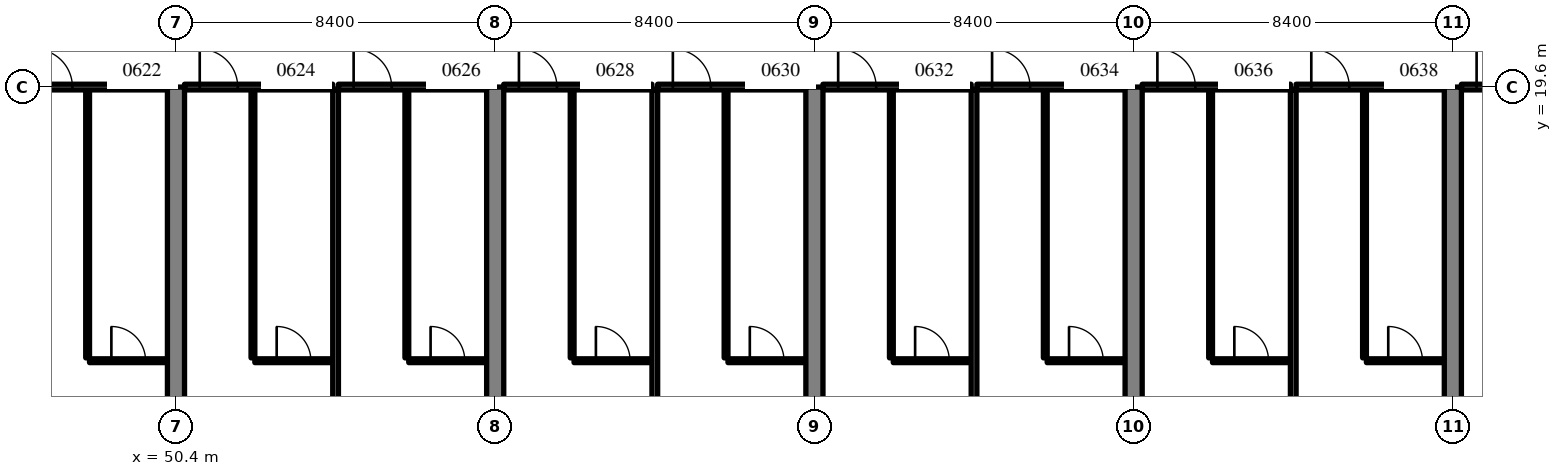
"""IFC4 building model, lengths in metres.
Left out: names, types, materials, properties, quantities, classifications, styles, units other than length and angle.
Written with IfcOpenShell. Run it as: python <this file> out.ifc"""

import sys

from ifc_helpers import new_model, si_unit, direction, frame, frame_2d, origin, place, context, subcontext, project, spatial, rectangle, extrude, source, transform, mapped, element, fill, save


model = new_model("IFC4")
c1 = context("Model", 3, precision=1e-05, world=origin(), true_north=direction((0.0, 1.0)))
c2 = subcontext(c1, "Body", "Model", "MODEL_VIEW")
j1 = project(units=[si_unit("LENGTHUNIT", "METRE"), si_unit("PLANEANGLEUNIT", "RADIAN")], contexts=[c1])
p1 = place(None, origin())
s1 = spatial("IfcSite", under=j1, at=p1, CompositionType="ELEMENT")
p2 = place(p1, origin())
s2 = spatial("IfcBuilding", under=s1, at=p2, CompositionType="ELEMENT")
p3 = place(p2, frame((0.0, 0.0, 31.6)))
s3 = spatial("IfcBuildingStorey", under=s2, at=p3, CompositionType="ELEMENT", Elevation=31.6)
m1 = source(origin(), c2, "Body", "SweptSolid", [
    extrude(rectangle(XDim=18.6, YDim=0.45, at=frame_2d((9.3, 0.0))), origin(), (0.0, 0.0, 1.0), 3.52),
])
p4 = place(p3, frame((50.4, 1.0, 0.0), z_axis=(0.0, 0.0, 1.0), x_axis=(0.0, 1.0, 0.0)))
e1 = element("IfcWall", 1, at=p4, inside=s3, PredefinedType="SHEAR", context=c2, shape_type="MappedRepresentation", body=[
    mapped(m1, transform((0.0, 0.0, 0.0), scale=1.0)),
])
m2 = source(origin(), c2, "Body", "SweptSolid", [
    extrude(rectangle(XDim=19.6, YDim=0.45, at=frame_2d((9.8, 0.0))), origin(), (0.0, 0.0, 1.0), 3.52),
])
for number, where, z_axis, x_axis in (
    (2, (58.8, 0.0, 0.0), (0.0, 0.0, 1.0), (0.0, 1.0, 0.0)),
    (3, (67.2, 0.0, 0.0), (0.0, 0.0, 1.0), (0.0, 1.0, 0.0)),
    (4, (75.6, 0.0, 0.0), (0.0, 0.0, 1.0), (0.0, 1.0, 0.0)),
    (5, (84.0, 0.0, 0.0), (0.0, 0.0, 1.0), (0.0, 1.0, 0.0)),
):
    element("IfcWall", number, at=place(p3, frame(where, z_axis=z_axis, x_axis=x_axis)), inside=s3, PredefinedType="SHEAR", context=c2, shape_type="MappedRepresentation", body=[
        mapped(m2, transform((0.0, 0.0, 0.0), scale=1.0)),
    ])
m3 = source(origin(), c2, "Body", "SweptSolid", [
    extrude(rectangle(XDim=7.05, YDim=0.1, at=frame_2d((3.525, 0.0))), origin(), (0.0, 0.0, 1.0), 3.52),
])
p5 = place(p3, frame((48.075, 12.475, 0.0), z_axis=(0.0, 0.0, 1.0), x_axis=(0.0, 1.0, 0.0)))
e6 = element("IfcWall", 6, at=p5, inside=s3, PredefinedType="PARTITIONING", context=c2, shape_type="MappedRepresentation", body=[
    mapped(m3, transform((0.0, 0.0, 0.0), scale=1.0)),
])
m4 = source(origin(), c2, "Body", "SweptSolid", [
    extrude(rectangle(XDim=2.05, YDim=0.1, at=frame_2d((1.025, 0.0))), origin(), (0.0, 0.0, 1.0), 3.52),
])
p6 = place(p3, frame((48.125, 12.4, 0.0), z_axis=(0.0, 0.0, 1.0), x_axis=(1.0, 0.0, 0.0)))
e7 = element("IfcWall", 7, at=p6, inside=s3, PredefinedType="PARTITIONING", context=c2, shape_type="MappedRepresentation", body=[
    mapped(m4, transform((0.0, 0.0, 0.0), scale=1.0)),
])
m5 = source(origin(), c2, "Body", "SweptSolid", [
    extrude(rectangle(XDim=0.9, YDim=2.1, at=frame_2d((0.45, 1.05))), frame((0.0, 0.06, 0.0), z_axis=(0.0, -1.0, 0.0), x_axis=(1.0, 0.0, 0.0)), (0.0, 0.0, 1.0), 0.12),
])
p7 = place(p6, frame((0.575, 0.0, 0.0)))
e8 = element("IfcOpeningElement", 8, at=p7, cuts=e7, PredefinedType="OPENING", context=c2, shape_type="MappedRepresentation", body=[
    mapped(m5, transform((0.0, 0.0, 0.0), scale=1.0)),
])
m6 = source(origin(), c2, "Body", "SweptSolid", [
    extrude(rectangle(XDim=3.9, YDim=0.15, at=frame_2d((1.95, 0.0))), origin(), (0.0, 0.0, 1.0), 2.82),
])
p8 = place(p3, frame((46.275, 19.6, 0.0), z_axis=(0.0, 0.0, 1.0), x_axis=(1.0, 0.0, 0.0)))
e9 = element("IfcWall", 9, at=p8, inside=s3, PredefinedType="PARTITIONING", context=c2, shape_type="MappedRepresentation", body=[
    mapped(m6, transform((0.0, 0.0, 0.0), scale=1.0)),
])
m7 = source(origin(), c2, "Body", "SweptSolid", [
    extrude(rectangle(XDim=1.0, YDim=2.1, at=frame_2d((0.5, 1.05))), frame((0.0, 0.085, 0.0), z_axis=(0.0, -1.0, 0.0), x_axis=(1.0, 0.0, 0.0)), (0.0, 0.0, 1.0), 0.17),
])
p9 = place(p8, frame((0.4, 0.0, 0.0)))
e10 = element("IfcOpeningElement", 10, at=p9, cuts=e9, PredefinedType="OPENING", context=c2, shape_type="MappedRepresentation", body=[
    mapped(m7, transform((0.0, 0.0, 0.0), scale=1.0)),
])
p10 = place(p3, frame((52.425, 12.475, 0.0), z_axis=(0.0, 0.0, 1.0), x_axis=(0.0, 1.0, 0.0)))
e11 = element("IfcWall", 11, at=p10, inside=s3, PredefinedType="PARTITIONING", context=c2, shape_type="MappedRepresentation", body=[
    mapped(m3, transform((0.0, 0.0, 0.0), scale=1.0)),
])
m8 = source(origin(), c2, "Body", "SweptSolid", [
    extrude(rectangle(XDim=2.05, YDim=0.1, at=frame_2d((1.025, 0.0))), origin(), (0.0, 0.0, 1.0), 3.52),
])
p11 = place(p3, frame((52.475, 12.4, 0.0), z_axis=(0.0, 0.0, 1.0), x_axis=(1.0, 0.0, 0.0)))
e12 = element("IfcWall", 12, at=p11, inside=s3, PredefinedType="PARTITIONING", context=c2, shape_type="MappedRepresentation", body=[
    mapped(m8, transform((0.0, 0.0, 0.0), scale=1.0)),
])
p12 = place(p11, frame((0.575, 0.0, 0.0)))
e13 = element("IfcOpeningElement", 13, at=p12, cuts=e12, PredefinedType="OPENING", context=c2, shape_type="MappedRepresentation", body=[
    mapped(m5, transform((0.0, 0.0, 0.0), scale=1.0)),
])
m9 = source(origin(), c2, "Body", "SweptSolid", [
    extrude(rectangle(XDim=3.9, YDim=0.15, at=frame_2d((1.95, 0.0))), origin(), (0.0, 0.0, 1.0), 2.82),
])
p13 = place(p3, frame((50.625, 19.6, 0.0), z_axis=(0.0, 0.0, 1.0), x_axis=(1.0, 0.0, 0.0)))
e14 = element("IfcWall", 14, at=p13, inside=s3, PredefinedType="PARTITIONING", context=c2, shape_type="MappedRepresentation", body=[
    mapped(m9, transform((0.0, 0.0, 0.0), scale=1.0)),
])
p14 = place(p13, frame((0.4, 0.0, 0.0)))
e15 = element("IfcOpeningElement", 15, at=p14, cuts=e14, PredefinedType="OPENING", context=c2, shape_type="MappedRepresentation", body=[
    mapped(m7, transform((0.0, 0.0, 0.0), scale=1.0)),
])
p15 = place(p3, frame((56.475, 12.475, 0.0), z_axis=(0.0, 0.0, 1.0), x_axis=(0.0, 1.0, 0.0)))
e16 = element("IfcWall", 16, at=p15, inside=s3, PredefinedType="PARTITIONING", context=c2, shape_type="MappedRepresentation", body=[
    mapped(m3, transform((0.0, 0.0, 0.0), scale=1.0)),
])
p16 = place(p3, frame((56.525, 12.4, 0.0), z_axis=(0.0, 0.0, 1.0), x_axis=(1.0, 0.0, 0.0)))
e17 = element("IfcWall", 17, at=p16, inside=s3, PredefinedType="PARTITIONING", context=c2, shape_type="MappedRepresentation", body=[
    mapped(m4, transform((0.0, 0.0, 0.0), scale=1.0)),
])
p17 = place(p16, frame((0.575, 0.0, 0.0)))
e18 = element("IfcOpeningElement", 18, at=p17, cuts=e17, PredefinedType="OPENING", context=c2, shape_type="MappedRepresentation", body=[
    mapped(m5, transform((0.0, 0.0, 0.0), scale=1.0)),
])
p18 = place(p3, frame((54.675, 19.6, 0.0), z_axis=(0.0, 0.0, 1.0), x_axis=(1.0, 0.0, 0.0)))
e19 = element("IfcWall", 19, at=p18, inside=s3, PredefinedType="PARTITIONING", context=c2, shape_type="MappedRepresentation", body=[
    mapped(m9, transform((0.0, 0.0, 0.0), scale=1.0)),
])
p19 = place(p18, frame((0.4, 0.0, 0.0)))
e20 = element("IfcOpeningElement", 20, at=p19, cuts=e19, PredefinedType="OPENING", context=c2, shape_type="MappedRepresentation", body=[
    mapped(m7, transform((0.0, 0.0, 0.0), scale=1.0)),
])
m10 = source(origin(), c2, "Body", "SweptSolid", [
    extrude(rectangle(XDim=20.406, YDim=0.15, at=frame_2d((10.203, 0.0))), origin(), (0.0, 0.0, 1.0), 3.52),
])
p20 = place(p3, frame((54.6, -0.881, 0.0), z_axis=(0.0, 0.0, 1.0), x_axis=(0.0, 1.0, 0.0)))
e21 = element("IfcWall", 21, at=p20, inside=s3, PredefinedType="PARTITIONING", context=c2, shape_type="MappedRepresentation", body=[
    mapped(m10, transform((0.0, 0.0, 0.0), scale=1.0)),
])
p21 = place(p3, frame((60.825, 12.475, 0.0), z_axis=(0.0, 0.0, 1.0), x_axis=(0.0, 1.0, 0.0)))
e22 = element("IfcWall", 22, at=p21, inside=s3, PredefinedType="PARTITIONING", context=c2, shape_type="MappedRepresentation", body=[
    mapped(m3, transform((0.0, 0.0, 0.0), scale=1.0)),
])
p22 = place(p3, frame((60.875, 12.4, 0.0), z_axis=(0.0, 0.0, 1.0), x_axis=(1.0, 0.0, 0.0)))
e23 = element("IfcWall", 23, at=p22, inside=s3, PredefinedType="PARTITIONING", context=c2, shape_type="MappedRepresentation", body=[
    mapped(m4, transform((0.0, 0.0, 0.0), scale=1.0)),
])
p23 = place(p22, frame((0.575, 0.0, 0.0)))
e24 = element("IfcOpeningElement", 24, at=p23, cuts=e23, PredefinedType="OPENING", context=c2, shape_type="MappedRepresentation", body=[
    mapped(m5, transform((0.0, 0.0, 0.0), scale=1.0)),
])
p24 = place(p3, frame((59.025, 19.6, 0.0), z_axis=(0.0, 0.0, 1.0), x_axis=(1.0, 0.0, 0.0)))
e25 = element("IfcWall", 25, at=p24, inside=s3, PredefinedType="PARTITIONING", context=c2, shape_type="MappedRepresentation", body=[
    mapped(m6, transform((0.0, 0.0, 0.0), scale=1.0)),
])
p25 = place(p24, frame((0.4, 0.0, 0.0)))
e26 = element("IfcOpeningElement", 26, at=p25, cuts=e25, PredefinedType="OPENING", context=c2, shape_type="MappedRepresentation", body=[
    mapped(m7, transform((0.0, 0.0, 0.0), scale=1.0)),
])
p26 = place(p3, frame((64.875, 12.475, 0.0), z_axis=(0.0, 0.0, 1.0), x_axis=(0.0, 1.0, 0.0)))
e27 = element("IfcWall", 27, at=p26, inside=s3, PredefinedType="PARTITIONING", context=c2, shape_type="MappedRepresentation", body=[
    mapped(m3, transform((0.0, 0.0, 0.0), scale=1.0)),
])
p27 = place(p3, frame((64.925, 12.4, 0.0), z_axis=(0.0, 0.0, 1.0), x_axis=(1.0, 0.0, 0.0)))
e28 = element("IfcWall", 28, at=p27, inside=s3, PredefinedType="PARTITIONING", context=c2, shape_type="MappedRepresentation", body=[
    mapped(m4, transform((0.0, 0.0, 0.0), scale=1.0)),
])
p28 = place(p27, frame((0.575, 0.0, 0.0)))
e29 = element("IfcOpeningElement", 29, at=p28, cuts=e28, PredefinedType="OPENING", context=c2, shape_type="MappedRepresentation", body=[
    mapped(m5, transform((0.0, 0.0, 0.0), scale=1.0)),
])
p29 = place(p3, frame((63.075, 19.6, 0.0), z_axis=(0.0, 0.0, 1.0), x_axis=(1.0, 0.0, 0.0)))
e30 = element("IfcWall", 30, at=p29, inside=s3, PredefinedType="PARTITIONING", context=c2, shape_type="MappedRepresentation", body=[
    mapped(m6, transform((0.0, 0.0, 0.0), scale=1.0)),
])
p30 = place(p29, frame((0.4, 0.0, 0.0)))
e31 = element("IfcOpeningElement", 31, at=p30, cuts=e30, PredefinedType="OPENING", context=c2, shape_type="MappedRepresentation", body=[
    mapped(m7, transform((0.0, 0.0, 0.0), scale=1.0)),
])
m11 = source(origin(), c2, "Body", "SweptSolid", [
    extrude(rectangle(XDim=20.998, YDim=0.15, at=frame_2d((10.499, 0.0))), origin(), (0.0, 0.0, 1.0), 3.52),
])
p31 = place(p3, frame((63.0, -1.473, 0.0), z_axis=(0.0, 0.0, 1.0), x_axis=(0.0, 1.0, 0.0)))
e32 = element("IfcWall", 32, at=p31, inside=s3, PredefinedType="PARTITIONING", context=c2, shape_type="MappedRepresentation", body=[
    mapped(m11, transform((0.0, 0.0, 0.0), scale=1.0)),
])
p32 = place(p3, frame((69.225, 12.475, 0.0), z_axis=(0.0, 0.0, 1.0), x_axis=(0.0, 1.0, 0.0)))
e33 = element("IfcWall", 33, at=p32, inside=s3, PredefinedType="PARTITIONING", context=c2, shape_type="MappedRepresentation", body=[
    mapped(m3, transform((0.0, 0.0, 0.0), scale=1.0)),
])
p33 = place(p3, frame((69.275, 12.4, 0.0), z_axis=(0.0, 0.0, 1.0), x_axis=(1.0, 0.0, 0.0)))
e34 = element("IfcWall", 34, at=p33, inside=s3, PredefinedType="PARTITIONING", context=c2, shape_type="MappedRepresentation", body=[
    mapped(m4, transform((0.0, 0.0, 0.0), scale=1.0)),
])
p34 = place(p33, frame((0.575, 0.0, 0.0)))
e35 = element("IfcOpeningElement", 35, at=p34, cuts=e34, PredefinedType="OPENING", context=c2, shape_type="MappedRepresentation", body=[
    mapped(m5, transform((0.0, 0.0, 0.0), scale=1.0)),
])
p35 = place(p3, frame((67.425, 19.6, 0.0), z_axis=(0.0, 0.0, 1.0), x_axis=(1.0, 0.0, 0.0)))
e36 = element("IfcWall", 36, at=p35, inside=s3, PredefinedType="PARTITIONING", context=c2, shape_type="MappedRepresentation", body=[
    mapped(m9, transform((0.0, 0.0, 0.0), scale=1.0)),
])
p36 = place(p35, frame((0.4, 0.0, 0.0)))
e37 = element("IfcOpeningElement", 37, at=p36, cuts=e36, PredefinedType="OPENING", context=c2, shape_type="MappedRepresentation", body=[
    mapped(m7, transform((0.0, 0.0, 0.0), scale=1.0)),
])
p37 = place(p3, frame((73.275, 12.475, 0.0), z_axis=(0.0, 0.0, 1.0), x_axis=(0.0, 1.0, 0.0)))
e38 = element("IfcWall", 38, at=p37, inside=s3, PredefinedType="PARTITIONING", context=c2, shape_type="MappedRepresentation", body=[
    mapped(m3, transform((0.0, 0.0, 0.0), scale=1.0)),
])
p38 = place(p3, frame((73.325, 12.4, 0.0), z_axis=(0.0, 0.0, 1.0), x_axis=(1.0, 0.0, 0.0)))
e39 = element("IfcWall", 39, at=p38, inside=s3, PredefinedType="PARTITIONING", context=c2, shape_type="MappedRepresentation", body=[
    mapped(m4, transform((0.0, 0.0, 0.0), scale=1.0)),
])
p39 = place(p38, frame((0.575, 0.0, 0.0)))
e40 = element("IfcOpeningElement", 40, at=p39, cuts=e39, PredefinedType="OPENING", context=c2, shape_type="MappedRepresentation", body=[
    mapped(m5, transform((0.0, 0.0, 0.0), scale=1.0)),
])
p40 = place(p3, frame((71.475, 19.6, 0.0), z_axis=(0.0, 0.0, 1.0), x_axis=(1.0, 0.0, 0.0)))
e41 = element("IfcWall", 41, at=p40, inside=s3, PredefinedType="PARTITIONING", context=c2, shape_type="MappedRepresentation", body=[
    mapped(m9, transform((0.0, 0.0, 0.0), scale=1.0)),
])
p41 = place(p40, frame((0.4, 0.0, 0.0)))
e42 = element("IfcOpeningElement", 42, at=p41, cuts=e41, PredefinedType="OPENING", context=c2, shape_type="MappedRepresentation", body=[
    mapped(m7, transform((0.0, 0.0, 0.0), scale=1.0)),
])
m12 = source(origin(), c2, "Body", "SweptSolid", [
    extrude(rectangle(XDim=18.625, YDim=0.15, at=frame_2d((9.312, 0.0))), origin(), (0.0, 0.0, 1.0), 3.52),
])
p42 = place(p3, frame((71.4, 0.9, 0.0), z_axis=(0.0, 0.0, 1.0), x_axis=(0.0, 1.0, 0.0)))
e43 = element("IfcWall", 43, at=p42, inside=s3, PredefinedType="PARTITIONING", context=c2, shape_type="MappedRepresentation", body=[
    mapped(m12, transform((0.0, 0.0, 0.0), scale=1.0)),
])
p43 = place(p3, frame((77.625, 12.475, 0.0), z_axis=(0.0, 0.0, 1.0), x_axis=(0.0, 1.0, 0.0)))
e44 = element("IfcWall", 44, at=p43, inside=s3, PredefinedType="PARTITIONING", context=c2, shape_type="MappedRepresentation", body=[
    mapped(m3, transform((0.0, 0.0, 0.0), scale=1.0)),
])
p44 = place(p3, frame((77.675, 12.4, 0.0), z_axis=(0.0, 0.0, 1.0), x_axis=(1.0, 0.0, 0.0)))
e45 = element("IfcWall", 45, at=p44, inside=s3, PredefinedType="PARTITIONING", context=c2, shape_type="MappedRepresentation", body=[
    mapped(m4, transform((0.0, 0.0, 0.0), scale=1.0)),
])
p45 = place(p44, frame((0.575, 0.0, 0.0)))
e46 = element("IfcOpeningElement", 46, at=p45, cuts=e45, PredefinedType="OPENING", context=c2, shape_type="MappedRepresentation", body=[
    mapped(m5, transform((0.0, 0.0, 0.0), scale=1.0)),
])
p46 = place(p3, frame((75.825, 19.6, 0.0), z_axis=(0.0, 0.0, 1.0), x_axis=(1.0, 0.0, 0.0)))
e47 = element("IfcWall", 47, at=p46, inside=s3, PredefinedType="PARTITIONING", context=c2, shape_type="MappedRepresentation", body=[
    mapped(m6, transform((0.0, 0.0, 0.0), scale=1.0)),
])
p47 = place(p46, frame((0.4, 0.0, 0.0)))
e48 = element("IfcOpeningElement", 48, at=p47, cuts=e47, PredefinedType="OPENING", context=c2, shape_type="MappedRepresentation", body=[
    mapped(m7, transform((0.0, 0.0, 0.0), scale=1.0)),
])
p48 = place(p3, frame((81.675, 12.475, 0.0), z_axis=(0.0, 0.0, 1.0), x_axis=(0.0, 1.0, 0.0)))
e49 = element("IfcWall", 49, at=p48, inside=s3, PredefinedType="PARTITIONING", context=c2, shape_type="MappedRepresentation", body=[
    mapped(m3, transform((0.0, 0.0, 0.0), scale=1.0)),
])
p49 = place(p3, frame((81.725, 12.4, 0.0), z_axis=(0.0, 0.0, 1.0), x_axis=(1.0, 0.0, 0.0)))
e50 = element("IfcWall", 50, at=p49, inside=s3, PredefinedType="PARTITIONING", context=c2, shape_type="MappedRepresentation", body=[
    mapped(m8, transform((0.0, 0.0, 0.0), scale=1.0)),
])
p50 = place(p49, frame((0.575, 0.0, 0.0)))
e51 = element("IfcOpeningElement", 51, at=p50, cuts=e50, PredefinedType="OPENING", context=c2, shape_type="MappedRepresentation", body=[
    mapped(m5, transform((0.0, 0.0, 0.0), scale=1.0)),
])
p51 = place(p3, frame((79.875, 19.6, 0.0), z_axis=(0.0, 0.0, 1.0), x_axis=(1.0, 0.0, 0.0)))
e52 = element("IfcWall", 52, at=p51, inside=s3, PredefinedType="PARTITIONING", context=c2, shape_type="MappedRepresentation", body=[
    mapped(m9, transform((0.0, 0.0, 0.0), scale=1.0)),
])
p52 = place(p51, frame((0.4, 0.0, 0.0)))
e53 = element("IfcOpeningElement", 53, at=p52, cuts=e52, PredefinedType="OPENING", context=c2, shape_type="MappedRepresentation", body=[
    mapped(m7, transform((0.0, 0.0, 0.0), scale=1.0)),
])
p53 = place(p3, frame((79.8, 0.9, 0.0), z_axis=(0.0, 0.0, 1.0), x_axis=(0.0, 1.0, 0.0)))
e54 = element("IfcWall", 54, at=p53, inside=s3, PredefinedType="PARTITIONING", context=c2, shape_type="MappedRepresentation", body=[
    mapped(m12, transform((0.0, 0.0, 0.0), scale=1.0)),
])
p54 = place(p3, frame((84.225, 19.6, 0.0), z_axis=(0.0, 0.0, 1.0), x_axis=(1.0, 0.0, 0.0)))
e55 = element("IfcWall", 55, at=p54, inside=s3, PredefinedType="PARTITIONING", context=c2, shape_type="MappedRepresentation", body=[
    mapped(m9, transform((0.0, 0.0, 0.0), scale=1.0)),
])
p55 = place(p54, frame((0.4, 0.0, 0.0)))
e56 = element("IfcOpeningElement", 56, at=p55, cuts=e55, PredefinedType="OPENING", context=c2, shape_type="MappedRepresentation", body=[
    mapped(m7, transform((0.0, 0.0, 0.0), scale=1.0)),
])
m13 = source(origin(), c2, "Body", "SweptSolid", [
    extrude(rectangle(XDim=0.9, YDim=2.1, at=frame_2d((0.45, 1.05))), frame((0.0, 0.025, 0.0), z_axis=(0.0, -1.0, 0.0), x_axis=(1.0, 0.0, 0.0)), (0.0, 0.0, 1.0), 0.05),
])
p56 = place(p7, origin())
e57 = element("IfcDoor", 57, at=p56, inside=s3, OperationType="SINGLE_SWING_LEFT", PredefinedType="DOOR", context=c2, shape_type="MappedRepresentation", body=[
    mapped(m13, transform((0.0, 0.0, 0.0), scale=1.0)),
])
fill(e8, e57)
m14 = source(origin(), c2, "Body", "SweptSolid", [
    extrude(rectangle(XDim=1.0, YDim=2.1, at=frame_2d((0.5, 1.05))), frame((0.0, 0.025, 0.0), z_axis=(0.0, -1.0, 0.0), x_axis=(1.0, 0.0, 0.0)), (0.0, 0.0, 1.0), 0.05),
])
p57 = place(p9, origin())
e58 = element("IfcDoor", 58, at=p57, inside=s3, OperationType="SINGLE_SWING_LEFT", PredefinedType="DOOR", context=c2, shape_type="MappedRepresentation", body=[
    mapped(m14, transform((0.0, 0.0, 0.0), scale=1.0)),
])
fill(e10, e58)
p58 = place(p12, origin())
e59 = element("IfcDoor", 59, at=p58, inside=s3, OperationType="SINGLE_SWING_LEFT", PredefinedType="DOOR", context=c2, shape_type="MappedRepresentation", body=[
    mapped(m13, transform((0.0, 0.0, 0.0), scale=1.0)),
])
fill(e13, e59)
p59 = place(p14, origin())
e60 = element("IfcDoor", 60, at=p59, inside=s3, OperationType="SINGLE_SWING_LEFT", PredefinedType="DOOR", context=c2, shape_type="MappedRepresentation", body=[
    mapped(m14, transform((0.0, 0.0, 0.0), scale=1.0)),
])
fill(e15, e60)
p60 = place(p17, origin())
e61 = element("IfcDoor", 61, at=p60, inside=s3, OperationType="SINGLE_SWING_LEFT", PredefinedType="DOOR", context=c2, shape_type="MappedRepresentation", body=[
    mapped(m13, transform((0.0, 0.0, 0.0), scale=1.0)),
])
fill(e18, e61)
p61 = place(p19, origin())
e62 = element("IfcDoor", 62, at=p61, inside=s3, OperationType="SINGLE_SWING_LEFT", PredefinedType="DOOR", context=c2, shape_type="MappedRepresentation", body=[
    mapped(m14, transform((0.0, 0.0, 0.0), scale=1.0)),
])
fill(e20, e62)
p62 = place(p23, origin())
e63 = element("IfcDoor", 63, at=p62, inside=s3, OperationType="SINGLE_SWING_LEFT", PredefinedType="DOOR", context=c2, shape_type="MappedRepresentation", body=[
    mapped(m13, transform((0.0, 0.0, 0.0), scale=1.0)),
])
fill(e24, e63)
p63 = place(p25, origin())
e64 = element("IfcDoor", 64, at=p63, inside=s3, OperationType="SINGLE_SWING_LEFT", PredefinedType="DOOR", context=c2, shape_type="MappedRepresentation", body=[
    mapped(m14, transform((0.0, 0.0, 0.0), scale=1.0)),
])
fill(e26, e64)
p64 = place(p28, origin())
e65 = element("IfcDoor", 65, at=p64, inside=s3, OperationType="SINGLE_SWING_LEFT", PredefinedType="DOOR", context=c2, shape_type="MappedRepresentation", body=[
    mapped(m13, transform((0.0, 0.0, 0.0), scale=1.0)),
])
fill(e29, e65)
p65 = place(p30, origin())
e66 = element("IfcDoor", 66, at=p65, inside=s3, OperationType="SINGLE_SWING_LEFT", PredefinedType="DOOR", context=c2, shape_type="MappedRepresentation", body=[
    mapped(m14, transform((0.0, 0.0, 0.0), scale=1.0)),
])
fill(e31, e66)
p66 = place(p34, origin())
e67 = element("IfcDoor", 67, at=p66, inside=s3, OperationType="SINGLE_SWING_LEFT", PredefinedType="DOOR", context=c2, shape_type="MappedRepresentation", body=[
    mapped(m13, transform((0.0, 0.0, 0.0), scale=1.0)),
])
fill(e35, e67)
p67 = place(p36, origin())
e68 = element("IfcDoor", 68, at=p67, inside=s3, OperationType="SINGLE_SWING_LEFT", PredefinedType="DOOR", context=c2, shape_type="MappedRepresentation", body=[
    mapped(m14, transform((0.0, 0.0, 0.0), scale=1.0)),
])
fill(e37, e68)
p68 = place(p39, origin())
e69 = element("IfcDoor", 69, at=p68, inside=s3, OperationType="SINGLE_SWING_LEFT", PredefinedType="DOOR", context=c2, shape_type="MappedRepresentation", body=[
    mapped(m13, transform((0.0, 0.0, 0.0), scale=1.0)),
])
fill(e40, e69)
p69 = place(p41, origin())
e70 = element("IfcDoor", 70, at=p69, inside=s3, OperationType="SINGLE_SWING_LEFT", PredefinedType="DOOR", context=c2, shape_type="MappedRepresentation", body=[
    mapped(m14, transform((0.0, 0.0, 0.0), scale=1.0)),
])
fill(e42, e70)
p70 = place(p45, origin())
e71 = element("IfcDoor", 71, at=p70, inside=s3, OperationType="SINGLE_SWING_LEFT", PredefinedType="DOOR", context=c2, shape_type="MappedRepresentation", body=[
    mapped(m13, transform((0.0, 0.0, 0.0), scale=1.0)),
])
fill(e46, e71)
p71 = place(p47, origin())
e72 = element("IfcDoor", 72, at=p71, inside=s3, OperationType="SINGLE_SWING_LEFT", PredefinedType="DOOR", context=c2, shape_type="MappedRepresentation", body=[
    mapped(m14, transform((0.0, 0.0, 0.0), scale=1.0)),
])
fill(e48, e72)
p72 = place(p50, origin())
e73 = element("IfcDoor", 73, at=p72, inside=s3, OperationType="SINGLE_SWING_LEFT", PredefinedType="DOOR", context=c2, shape_type="MappedRepresentation", body=[
    mapped(m13, transform((0.0, 0.0, 0.0), scale=1.0)),
])
fill(e51, e73)
p73 = place(p52, origin())
e74 = element("IfcDoor", 74, at=p73, inside=s3, OperationType="SINGLE_SWING_LEFT", PredefinedType="DOOR", context=c2, shape_type="MappedRepresentation", body=[
    mapped(m14, transform((0.0, 0.0, 0.0), scale=1.0)),
])
fill(e53, e74)
p74 = place(p55, origin())
e75 = element("IfcDoor", 75, at=p74, inside=s3, OperationType="SINGLE_SWING_LEFT", PredefinedType="DOOR", context=c2, shape_type="MappedRepresentation", body=[
    mapped(m14, transform((0.0, 0.0, 0.0), scale=1.0)),
])
fill(e56, e75)
save(model, sys.argv[1])
